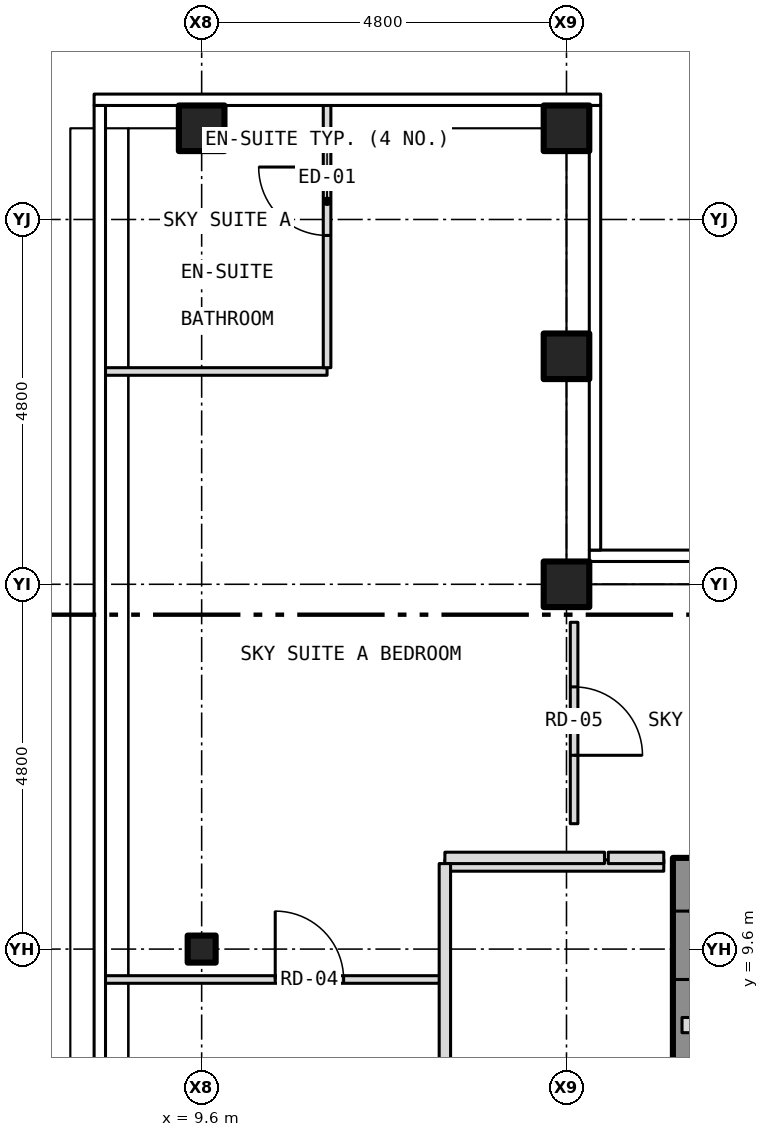
"""IFC4 building model, lengths in metres.
Left out: names, types, materials, properties, quantities, classifications, styles, units other than length and angle.
Written with IfcOpenShell. Run it as: python <this file> out.ifc"""

import sys

from ifc_helpers import new_model, si_unit, direction, frame, frame_2d, origin, origin_2d, place, context, subcontext, project, spatial, rectangle, hollow_rectangle, i_section, extrude, element, fill, save


model = new_model("IFC4")
c1 = context("Model", 3, precision=1e-05, world=origin(), true_north=direction((0.0, 1.0)))
c2 = subcontext(c1, "Body", "Model", "MODEL_VIEW")
j1 = project(units=[si_unit("LENGTHUNIT", "METRE"), si_unit("PLANEANGLEUNIT", "RADIAN")], contexts=[c1])
p1 = place(None, origin())
s1 = spatial("IfcSite", under=j1, at=p1, CompositionType="ELEMENT")
p2 = place(p1, origin())
s2 = spatial("IfcBuilding", under=s1, at=p2, CompositionType="ELEMENT")
p3 = place(p2, frame((0.0, 0.0, 272.5)))
s3 = spatial("IfcBuildingStorey", under=s2, at=p3, CompositionType="ELEMENT", Elevation=272.5)
for number, where, z_axis, x_axis in (
    (1, (9.6, 20.4, -0.15), (0.0, 0.0, 1.0), (1.0, 0.0, 0.0)),
    (2, (14.4, 20.4, -0.15), (0.0, 0.0, 1.0), (1.0, 0.0, 0.0)),
    (3, (14.4, 14.4, -0.15), (0.0, 0.0, 1.0), (1.0, 0.0, 0.0)),
    (4, (14.4, 17.4, -0.15), (0.0, 0.0, 1.0), (1.0, 0.0, 0.0)),
):
    element("IfcColumn", number, at=place(p3, frame(where, z_axis=z_axis, x_axis=x_axis)), inside=s3, PredefinedType="COLUMN", context=c2, shape_type="SweptSolid", body=[
        extrude(hollow_rectangle(XDim=0.6, YDim=0.6, WallThickness=0.03, at=origin_2d()), origin(), (0.0, 0.0, 1.0), 3.5),
    ])
p4 = place(p3, frame((9.6, 9.6, -0.15), z_axis=(0.0, 0.0, 1.0), x_axis=(1.0, 0.0, 0.0)))
e5 = element("IfcColumn", 5, at=p4, inside=s3, PredefinedType="COLUMN", context=c2, shape_type="SweptSolid", body=[
    extrude(i_section(OverallWidth=0.368, OverallDepth=0.356, WebThickness=0.011, FlangeThickness=0.018, at=origin_2d()), origin(), (0.0, 0.0, 1.0), 3.5),
])
p5 = place(p3, frame((16.0, -10.8, 0.0), z_axis=(0.0, 0.0, 1.0), x_axis=(0.0, 1.0, 0.0)))
e6 = element("IfcWall", 6, at=p5, inside=s3, PredefinedType="SHEAR", context=c2, shape_type="SweptSolid", body=[
    extrude(rectangle(XDim=21.6, YDim=0.4, at=frame_2d((10.8, 0.0))), origin(), (0.0, 0.0, 1.0), 3.25),
])
p6 = place(p5, frame((9.4, 0.0, 0.0)))
e7 = element("IfcOpeningElement", 7, at=p6, cuts=e6, PredefinedType="OPENING", context=c2, shape_type="SweptSolid", body=[
    extrude(rectangle(XDim=1.1, YDim=2.1, at=frame_2d((0.55, 1.05))), frame((0.0, 0.212, 0.0), z_axis=(0.0, -1.0, 0.0), x_axis=(1.0, 0.0, 0.0)), (0.0, 0.0, 1.0), 0.424),
])
p7 = place(p5, frame((11.5, 0.0, 0.0)))
e8 = element("IfcOpeningElement", 8, at=p7, cuts=e6, PredefinedType="OPENING", context=c2, shape_type="SweptSolid", body=[
    extrude(rectangle(XDim=1.1, YDim=2.1, at=frame_2d((0.55, 1.05))), frame((0.0, 0.212, 0.0), z_axis=(0.0, -1.0, 0.0), x_axis=(1.0, 0.0, 0.0)), (0.0, 0.0, 1.0), 0.424),
])
p8 = place(p5, frame((13.6, 0.0, 0.0)))
e9 = element("IfcOpeningElement", 9, at=p8, cuts=e6, PredefinedType="OPENING", context=c2, shape_type="SweptSolid", body=[
    extrude(rectangle(XDim=1.1, YDim=2.1, at=frame_2d((0.55, 1.05))), frame((0.0, 0.212, 0.0), z_axis=(0.0, -1.0, 0.0), x_axis=(1.0, 0.0, 0.0)), (0.0, 0.0, 1.0), 0.424),
])
p9 = place(p5, frame((15.7, 0.0, 0.0)))
e10 = element("IfcOpeningElement", 10, at=p9, cuts=e6, PredefinedType="OPENING", context=c2, shape_type="SweptSolid", body=[
    extrude(rectangle(XDim=1.1, YDim=2.1, at=frame_2d((0.55, 1.05))), frame((0.0, 0.212, 0.0), z_axis=(0.0, -1.0, 0.0), x_axis=(1.0, 0.0, 0.0)), (0.0, 0.0, 1.0), 0.424),
])
p10 = place(p5, frame((17.8, 0.0, 0.0)))
e11 = element("IfcOpeningElement", 11, at=p10, cuts=e6, PredefinedType="OPENING", context=c2, shape_type="SweptSolid", body=[
    extrude(rectangle(XDim=1.1, YDim=2.1, at=frame_2d((0.55, 1.05))), frame((0.0, 0.212, 0.0), z_axis=(0.0, -1.0, 0.0), x_axis=(1.0, 0.0, 0.0)), (0.0, 0.0, 1.0), 0.424),
])
p11 = place(p5, frame((5.642, 0.0, 0.0)))
e12 = element("IfcOpeningElement", 12, at=p11, cuts=e6, PredefinedType="OPENING", context=c2, shape_type="SweptSolid", body=[
    extrude(rectangle(XDim=1.1, YDim=2.1, at=frame_2d((0.55, 1.05))), frame((0.0, 0.212, 0.0), z_axis=(0.0, -1.0, 0.0), x_axis=(1.0, 0.0, 0.0)), (0.0, 0.0, 1.0), 0.424),
])
p12 = place(p5, frame((7.5, 0.0, 0.0)))
e13 = element("IfcOpeningElement", 13, at=p12, cuts=e6, PredefinedType="OPENING", context=c2, shape_type="SweptSolid", body=[
    extrude(rectangle(XDim=1.1, YDim=2.1, at=frame_2d((0.55, 1.05))), frame((0.0, 0.212, 0.0), z_axis=(0.0, -1.0, 0.0), x_axis=(1.0, 0.0, 0.0)), (0.0, 0.0, 1.0), 0.424),
])
p13 = place(p5, frame((20.0, 0.0, 0.0)))
e14 = element("IfcOpeningElement", 14, at=p13, cuts=e6, PredefinedType="OPENING", context=c2, shape_type="SweptSolid", body=[
    extrude(rectangle(XDim=0.9, YDim=2.1, at=frame_2d((0.45, 1.05))), frame((0.0, 0.212, 0.0), z_axis=(0.0, -1.0, 0.0), x_axis=(1.0, 0.0, 0.0)), (0.0, 0.0, 1.0), 0.424),
])
p14 = place(p3, frame((15.92, 8.6, 0.0), z_axis=(0.0, 0.0, 1.0), x_axis=(1.0, 0.0, 0.0)))
e15 = element("IfcWall", 15, at=p14, inside=s3, PredefinedType="PARTITIONING", context=c2, shape_type="SweptSolid", body=[
    extrude(rectangle(XDim=4.36, YDim=0.2, at=frame_2d((2.18, 0.0))), origin(), (0.0, 0.0, 1.0), 3.25),
])
p15 = place(p3, frame((8.305, 9.2, 0.0), z_axis=(0.0, 0.0, 1.0), x_axis=(1.0, 0.0, 0.0)))
e16 = element("IfcWall", 16, at=p15, inside=s3, PredefinedType="PARTITIONING", context=c2, shape_type="SweptSolid", body=[
    extrude(rectangle(XDim=4.495, YDim=0.1, at=frame_2d((2.248, 0.0))), origin(), (0.0, 0.0, 1.0), 3.35),
])
p16 = place(p15, frame((2.263, 0.0, 0.0)))
e17 = element("IfcOpeningElement", 17, at=p16, cuts=e16, PredefinedType="OPENING", context=c2, shape_type="SweptSolid", body=[
    extrude(rectangle(XDim=0.9, YDim=2.1, at=frame_2d((0.45, 1.05))), frame((0.0, 0.062, 0.0), z_axis=(0.0, -1.0, 0.0), x_axis=(1.0, 0.0, 0.0)), (0.0, 0.0, 1.0), 0.124),
])
p17 = place(p3, frame((12.8, 10.7, 0.0), z_axis=(0.0, 0.0, 1.0), x_axis=(1.0, 0.0, 0.0)))
e18 = element("IfcWall", 18, at=p17, inside=s3, PredefinedType="PARTITIONING", context=c2, shape_type="SweptSolid", body=[
    extrude(rectangle(XDim=2.88, YDim=0.15, at=frame_2d((1.44, 0.0))), origin(), (0.0, 0.0, 1.0), 3.35),
])
p18 = place(p3, frame((12.8, 10.8, 0.0), z_axis=(0.0, 0.0, 1.0), x_axis=(1.0, 0.0, 0.0)))
e19 = element("IfcWall", 19, at=p18, inside=s3, PredefinedType="PARTITIONING", context=c2, shape_type="SweptSolid", body=[
    extrude(rectangle(XDim=2.1, YDim=0.15, at=frame_2d((1.05, 0.0))), origin(), (0.0, 0.0, 1.0), 3.35),
])
p19 = place(p3, frame((14.95, 10.8, 0.0), z_axis=(0.0, 0.0, 1.0), x_axis=(1.0, 0.0, 0.0)))
e20 = element("IfcWall", 20, at=p19, inside=s3, PredefinedType="PARTITIONING", context=c2, shape_type="SweptSolid", body=[
    extrude(rectangle(XDim=0.73, YDim=0.15, at=frame_2d((0.365, 0.0))), origin(), (0.0, 0.0, 1.0), 3.35),
])
p20 = place(p3, frame((8.305, 17.2, 0.0), z_axis=(0.0, 0.0, 1.0), x_axis=(1.0, 0.0, 0.0)))
e21 = element("IfcWall", 21, at=p20, inside=s3, PredefinedType="PARTITIONING", context=c2, shape_type="SweptSolid", body=[
    extrude(rectangle(XDim=2.945, YDim=0.1, at=frame_2d((1.473, 0.0))), origin(), (0.0, 0.0, 1.0), 3.35),
])
p21 = place(p3, frame((11.25, 17.25, 0.0), z_axis=(0.0, 0.0, 1.0), x_axis=(0.0, 1.0, 0.0)))
e22 = element("IfcWall", 22, at=p21, inside=s3, PredefinedType="PARTITIONING", context=c2, shape_type="SweptSolid", body=[
    extrude(rectangle(XDim=3.48, YDim=0.1, at=frame_2d((1.74, 0.0))), origin(), (0.0, 0.0, 1.0), 3.35),
])
p22 = place(p21, frame((1.74, 0.0, 0.0)))
e23 = element("IfcOpeningElement", 23, at=p22, cuts=e22, PredefinedType="OPENING", context=c2, shape_type="SweptSolid", body=[
    extrude(rectangle(XDim=0.9, YDim=2.1, at=frame_2d((0.45, 1.05))), frame((0.0, 0.062, 0.0), z_axis=(0.0, -1.0, 0.0), x_axis=(1.0, 0.0, 0.0)), (0.0, 0.0, 1.0), 0.124),
])
p23 = place(p3, frame((12.8, 2.4, 0.0), z_axis=(0.0, 0.0, 1.0), x_axis=(0.0, 1.0, 0.0)))
e24 = element("IfcWall", 24, at=p23, inside=s3, PredefinedType="PARTITIONING", context=c2, shape_type="SweptSolid", body=[
    extrude(rectangle(XDim=8.325, YDim=0.15, at=frame_2d((4.163, 0.0))), origin(), (0.0, 0.0, 1.0), 3.35),
])
p24 = place(p23, frame((2.89, 0.0, 0.0)))
e25 = element("IfcOpeningElement", 25, at=p24, cuts=e24, PredefinedType="OPENING", context=c2, shape_type="SweptSolid", body=[
    extrude(rectangle(XDim=0.9, YDim=2.1, at=frame_2d((0.45, 1.05))), frame((0.0, 0.087, 0.0), z_axis=(0.0, -1.0, 0.0), x_axis=(1.0, 0.0, 0.0)), (0.0, 0.0, 1.0), 0.174),
])
p25 = place(p3, frame((14.5, 11.25, 0.0), z_axis=(0.0, 0.0, 1.0), x_axis=(0.0, 1.0, 0.0)))
e26 = element("IfcWall", 26, at=p25, inside=s3, PredefinedType="PARTITIONING", context=c2, shape_type="SweptSolid", body=[
    extrude(rectangle(XDim=2.65, YDim=0.1, at=frame_2d((1.325, 0.0))), origin(), (0.0, 0.0, 1.0), 2.817),
])
p26 = place(p25, frame((0.9, 0.0, 0.0)))
e27 = element("IfcOpeningElement", 27, at=p26, cuts=e26, PredefinedType="OPENING", context=c2, shape_type="SweptSolid", body=[
    extrude(rectangle(XDim=0.9, YDim=2.1, at=frame_2d((0.45, 1.05))), frame((0.0, 0.062, 0.0), z_axis=(0.0, -1.0, 0.0), x_axis=(1.0, 0.0, 0.0)), (0.0, 0.0, 1.0), 0.124),
])
p27 = place(p13, origin())
e28 = element("IfcDoor", 28, at=p27, inside=s3, OperationType="SINGLE_SWING_RIGHT", PredefinedType="DOOR", context=c2, shape_type="SweptSolid", body=[
    extrude(rectangle(XDim=0.9, YDim=2.1, at=frame_2d((0.45, 1.05))), frame((0.0, 0.025, 0.0), z_axis=(0.0, -1.0, 0.0), x_axis=(1.0, 0.0, 0.0)), (0.0, 0.0, 1.0), 0.05),
])
fill(e14, e28)
p28 = place(p16, origin())
e29 = element("IfcDoor", 29, at=p28, inside=s3, OperationType="SINGLE_SWING_LEFT", PredefinedType="DOOR", context=c2, shape_type="SweptSolid", body=[
    extrude(rectangle(XDim=0.9, YDim=2.1, at=frame_2d((0.45, 1.05))), frame((0.0, 0.025, 0.0), z_axis=(0.0, -1.0, 0.0), x_axis=(1.0, 0.0, 0.0)), (0.0, 0.0, 1.0), 0.05),
])
fill(e17, e29)
p29 = place(p22, origin())
e30 = element("IfcDoor", 30, at=p29, inside=s3, OperationType="SINGLE_SWING_RIGHT", PredefinedType="DOOR", context=c2, shape_type="SweptSolid", body=[
    extrude(rectangle(XDim=0.9, YDim=2.1, at=frame_2d((0.45, 1.05))), frame((0.0, 0.025, 0.0), z_axis=(0.0, -1.0, 0.0), x_axis=(1.0, 0.0, 0.0)), (0.0, 0.0, 1.0), 0.05),
])
fill(e23, e30)
p30 = place(p26, origin())
e31 = element("IfcDoor", 31, at=p30, inside=s3, OperationType="SINGLE_SWING_LEFT", PredefinedType="DOOR", context=c2, shape_type="SweptSolid", body=[
    extrude(rectangle(XDim=0.9, YDim=2.1, at=frame_2d((0.45, 1.05))), frame((0.0, 0.025, 0.0), z_axis=(0.0, -1.0, 0.0), x_axis=(1.0, 0.0, 0.0)), (0.0, 0.0, 1.0), 0.05),
])
fill(e27, e31)
save(model, sys.argv[1])
